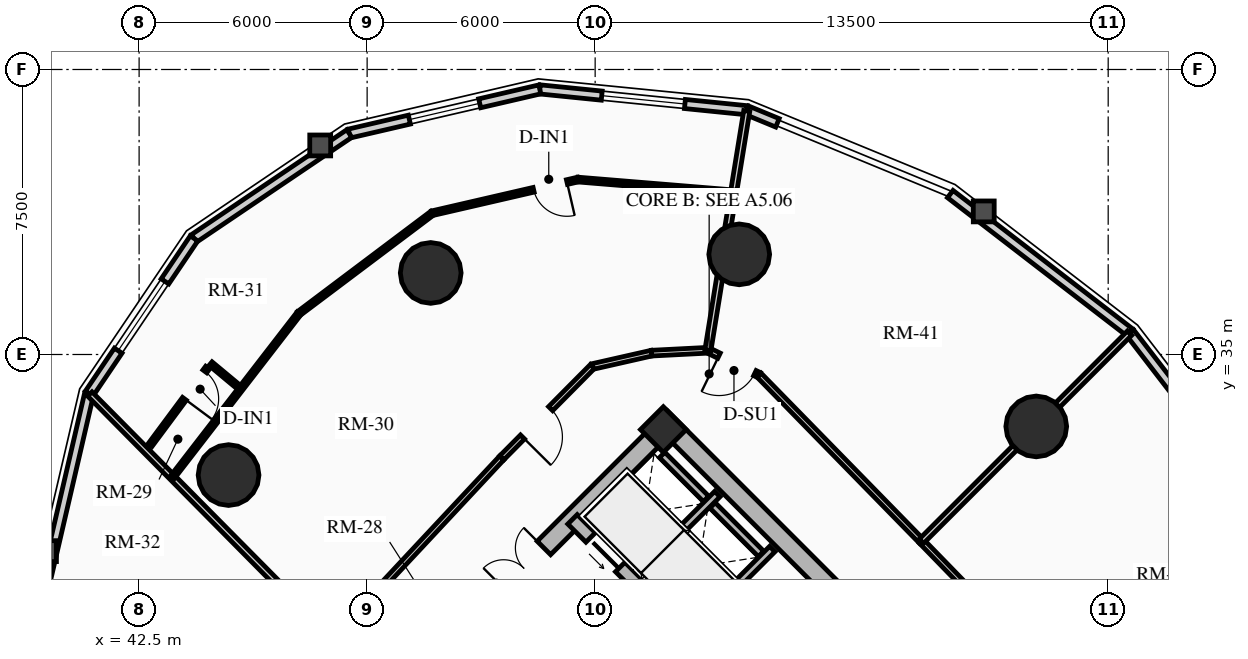
"""IFC4 building model, lengths in metres.
Left out: names, types, materials, properties, quantities, classifications, styles, units other than length and angle.
Written with IfcOpenShell. Run it as: python <this file> out.ifc"""

import sys

from ifc_helpers import new_model, si_unit, direction, frame, frame_2d, origin, origin_2d, place, context, subcontext, project, spatial, rectangle, circle, extrude, source, transform, mapped, element, fill, save


model = new_model("IFC4")
c1 = context("Model", 3, precision=1e-05, world=origin(), true_north=direction((0.0, 1.0)))
c2 = subcontext(c1, "Body", "Model", "MODEL_VIEW")
j1 = project(units=[si_unit("LENGTHUNIT", "METRE"), si_unit("PLANEANGLEUNIT", "RADIAN")], contexts=[c1])
p1 = place(None, origin())
s1 = spatial("IfcSite", under=j1, at=p1, CompositionType="ELEMENT")
p2 = place(p1, origin())
s2 = spatial("IfcBuilding", under=s1, at=p2, CompositionType="ELEMENT")
p3 = place(p2, frame((0.0, 0.0, 62.74)))
s3 = spatial("IfcBuildingStorey", under=s2, at=p3, CompositionType="ELEMENT", Elevation=62.74)
p4 = place(p3, frame((66.339, 23.227, 0.0), z_axis=(0.0, 0.0, 1.0), x_axis=(-0.707106781187, 0.707106781187, 0.0)))
e1 = element("IfcWall", 1, at=p4, inside=s3, PredefinedType="SHEAR", context=c2, shape_type="SweptSolid", body=[
    extrude(rectangle(XDim=14.3, YDim=0.5, at=frame_2d((7.15, 0.0))), origin(), (0.0, 0.0, 1.0), 2.91),
])
p5 = place(p3, frame((48.838, 25.596, 0.0), z_axis=(0.0, 0.0, 1.0), x_axis=(0.707106781187, 0.707106781187, 0.0)))
e2 = element("IfcWall", 2, at=p5, inside=s3, PredefinedType="SHEAR", context=c2, shape_type="SweptSolid", body=[
    extrude(rectangle(XDim=10.7, YDim=0.5, at=frame_2d((5.35, 0.0))), origin(), (0.0, 0.0, 1.0), 2.91),
])
m1 = source(origin(), c2, "Body", "SweptSolid", [
    extrude(rectangle(XDim=1.5, YDim=2.02, at=frame_2d((0.75, 1.01))), frame((0.0, 0.26, 0.0), z_axis=(0.0, -1.0, 0.0), x_axis=(1.0, 0.0, 0.0)), (0.0, 0.0, 1.0), 0.52),
])
p6 = place(p5, frame((4.6, 0.0, 0.0)))
e3 = element("IfcOpeningElement", 3, at=p6, cuts=e2, PredefinedType="OPENING", context=c2, shape_type="MappedRepresentation", body=[
    mapped(m1, transform((0.0, 0.0, 0.0), x_axis=(1.0, 0.0, 0.0), y_axis=(0.0, 1.0, 0.0), z_axis=(0.0, 0.0, 1.0), scale=1.0)),
])
p7 = place(p3, frame((63.662, 20.904, 0.0), z_axis=(0.0, 0.0, 1.0), x_axis=(-0.707106781187, 0.707106781187, 0.0)))
e4 = element("IfcWall", 4, at=p7, inside=s3, PredefinedType="SHEAR", context=c2, shape_type="SweptSolid", body=[
    extrude(rectangle(XDim=13.8, YDim=0.35, at=frame_2d((6.9, 0.0))), origin(), (0.0, 0.0, 1.0), 2.91),
])
m2 = source(origin(), c2, "Body", "SweptSolid", [
    extrude(rectangle(XDim=1.1, YDim=2.015, at=frame_2d((0.55, 1.007))), frame((0.0, 0.185, 0.0), z_axis=(0.0, -1.0, 0.0), x_axis=(1.0, 0.0, 0.0)), (0.0, 0.0, 1.0), 0.37),
])
p8 = place(p7, frame((10.025, 0.0, 0.0)))
e5 = element("IfcOpeningElement", 5, at=p8, cuts=e4, PredefinedType="OPENING", context=c2, shape_type="MappedRepresentation", body=[
    mapped(m2, transform((0.0, 0.0, 0.0), x_axis=(1.0, 0.0, 0.0), y_axis=(0.0, 1.0, 0.0), z_axis=(0.0, 0.0, 1.0), scale=1.0)),
])
p9 = place(p7, frame((12.025, 0.0, 0.0)))
e6 = element("IfcOpeningElement", 6, at=p9, cuts=e4, PredefinedType="OPENING", context=c2, shape_type="MappedRepresentation", body=[
    mapped(m2, transform((0.0, 0.0, 0.0), x_axis=(1.0, 0.0, 0.0), y_axis=(0.0, 1.0, 0.0), z_axis=(0.0, 0.0, 1.0), scale=1.0)),
])
m3 = source(origin(), c2, "Body", "SweptSolid", [
    extrude(rectangle(XDim=1.15, YDim=2.02, at=frame_2d((0.575, 1.01))), frame((0.0, 0.185, 0.0), z_axis=(0.0, -1.0, 0.0), x_axis=(1.0, 0.0, 0.0)), (0.0, 0.0, 1.0), 0.37),
])
p10 = place(p7, frame((5.33, 0.0, 0.0)))
e7 = element("IfcOpeningElement", 7, at=p10, cuts=e4, PredefinedType="OPENING", context=c2, shape_type="MappedRepresentation", body=[
    mapped(m3, transform((0.0, 0.0, 0.0), x_axis=(1.0, 0.0, 0.0), y_axis=(0.0, 1.0, 0.0), z_axis=(0.0, 0.0, 1.0), scale=1.0)),
])
p11 = place(p3, frame((56.294, 33.024, 0.0), z_axis=(0.0, 0.0, 1.0), x_axis=(0.707106781187, 0.707106781187, 0.0)))
e8 = element("IfcColumn", 8, at=p11, inside=s3, PredefinedType="COLUMN", context=c2, shape_type="SweptSolid", body=[
    extrude(rectangle(XDim=0.85, YDim=0.85, at=origin_2d()), origin(), (0.0, 0.0, 1.0), 2.91),
])
for number, where, z_axis, x_axis in (
    (9, (66.107, 33.107, 0.0), (0.0, 0.0, 1.0), (1.0, 0.0, 0.0)),
    (10, (58.291, 37.635, 0.0), (0.0, 0.0, 1.0), (1.0, 0.0, 0.0)),
    (11, (50.173, 37.146, 0.0), (0.0, 0.0, 1.0), (1.0, 0.0, 0.0)),
    (12, (44.854, 31.827, 0.0), (0.0, 0.0, 1.0), (1.0, 0.0, 0.0)),
):
    element("IfcColumn", number, at=place(p3, frame(where, z_axis=z_axis, x_axis=x_axis)), inside=s3, PredefinedType="USERDEFINED", context=c2, shape_type="SweptSolid", body=[
        extrude(circle(Radius=0.8, at=origin_2d()), origin(), (0.0, 0.0, 1.0), 2.91),
    ])
p12 = place(p3, frame((63.844, 39.222, 0.0), z_axis=(0.0, 0.0, 1.0), x_axis=(0.792014314407, -0.610502519057, 0.0)))
e13 = element("IfcWall", 13, at=p12, inside=s3, PredefinedType="SOLIDWALL", context=c2, shape_type="SweptSolid", body=[
    extrude(rectangle(XDim=5.973, YDim=0.24, at=frame_2d((2.987, 0.0))), origin(), (0.0, 0.0, 1.0), 2.079),
])
p13 = place(p3, frame((58.493, 41.428, 0.0), z_axis=(0.0, 0.0, 1.0), x_axis=(0.924556017656, -0.381046152345, 0.0)))
e14 = element("IfcWall", 14, at=p13, inside=s3, PredefinedType="SOLIDWALL", context=c2, shape_type="SweptSolid", body=[
    extrude(rectangle(XDim=0.87, YDim=0.24, at=frame_2d((0.435, 0.0))), origin(), (0.0, 0.0, 1.0), 2.079),
])
p14 = place(p3, frame((53.043, 41.976, 0.0), z_axis=(0.0, 0.0, 1.0), x_axis=(0.994970765694, -0.100165739718, 0.0)))
e15 = element("IfcWall", 15, at=p14, inside=s3, PredefinedType="SOLIDWALL", context=c2, shape_type="SweptSolid", body=[
    extrude(rectangle(XDim=5.477, YDim=0.24, at=frame_2d((2.738, 0.0))), origin(), (0.0, 0.0, 1.0), 2.079),
])
m4 = source(origin(), c2, "Body", "SweptSolid", [
    extrude(rectangle(XDim=2.2, YDim=1.35, at=frame_2d((1.1, 0.675))), frame((0.0, 0.13, 0.0), z_axis=(0.0, -1.0, 0.0), x_axis=(1.0, 0.0, 0.0)), (0.0, 0.0, 1.0), 0.26),
])
p15 = place(p14, frame((1.638, 0.0, 0.65)))
e16 = element("IfcOpeningElement", 16, at=p15, cuts=e15, PredefinedType="OPENING", context=c2, shape_type="MappedRepresentation", body=[
    mapped(m4, transform((0.0, 0.0, 0.0), x_axis=(1.0, 0.0, 0.0), y_axis=(0.0, 1.0, 0.0), z_axis=(0.0, 0.0, 1.0), scale=1.0)),
])
p16 = place(p3, frame((48.031, 40.814, 0.0), z_axis=(0.0, 0.0, 1.0), x_axis=(0.974166016949, 0.225833060959, 0.0)))
e17 = element("IfcWall", 17, at=p16, inside=s3, PredefinedType="SOLIDWALL", context=c2, shape_type="SweptSolid", body=[
    extrude(rectangle(XDim=5.146, YDim=0.24, at=frame_2d((2.573, 0.0))), origin(), (0.0, 0.0, 1.0), 2.079),
])
m5 = source(origin(), c2, "Body", "SweptSolid", [
    extrude(rectangle(XDim=1.9, YDim=1.35, at=frame_2d((0.95, 0.675))), frame((0.0, 0.13, 0.0), z_axis=(0.0, -1.0, 0.0), x_axis=(1.0, 0.0, 0.0)), (0.0, 0.0, 1.0), 0.26),
])
p17 = place(p16, frame((1.623, 0.0, 0.65)))
e18 = element("IfcOpeningElement", 18, at=p17, cuts=e17, PredefinedType="OPENING", context=c2, shape_type="MappedRepresentation", body=[
    mapped(m5, transform((0.0, 0.0, 0.0), x_axis=(1.0, 0.0, 0.0), y_axis=(0.0, 1.0, 0.0), z_axis=(0.0, 0.0, 1.0), scale=1.0)),
])
p18 = place(p3, frame((43.945, 38.055, 0.0), z_axis=(0.0, 0.0, 1.0), x_axis=(0.828736708604, 0.559638693991, 0.0)))
e19 = element("IfcWall", 19, at=p18, inside=s3, PredefinedType="SOLIDWALL", context=c2, shape_type="SweptSolid", body=[
    extrude(rectangle(XDim=4.93, YDim=0.24, at=frame_2d((2.465, 0.0))), origin(), (0.0, 0.0, 1.0), 2.079),
])
p19 = place(p3, frame((41.186, 33.969, 0.0), z_axis=(0.0, 0.0, 1.0), x_axis=(0.559638693991, 0.828736708604, 0.0)))
e20 = element("IfcWall", 20, at=p19, inside=s3, PredefinedType="SOLIDWALL", context=c2, shape_type="SweptSolid", body=[
    extrude(rectangle(XDim=4.93, YDim=0.24, at=frame_2d((2.465, 0.0))), origin(), (0.0, 0.0, 1.0), 2.079),
])
p20 = place(p19, frame((1.365, 0.0, 0.65)))
e21 = element("IfcOpeningElement", 21, at=p20, cuts=e20, PredefinedType="OPENING", context=c2, shape_type="MappedRepresentation", body=[
    mapped(m4, transform((0.0, 0.0, 0.0), x_axis=(1.0, 0.0, 0.0), y_axis=(0.0, 1.0, 0.0), z_axis=(0.0, 0.0, 1.0), scale=1.0)),
])
p21 = place(p3, frame((40.024, 28.957, 0.0), z_axis=(0.0, 0.0, 1.0), x_axis=(0.225833060959, 0.974166016949, 0.0)))
e22 = element("IfcWall", 22, at=p21, inside=s3, PredefinedType="SOLIDWALL", context=c2, shape_type="SweptSolid", body=[
    extrude(rectangle(XDim=5.146, YDim=0.24, at=frame_2d((2.573, 0.0))), origin(), (0.0, 0.0, 1.0), 2.079),
])
p22 = place(p3, frame((68.575, 35.575, 0.0), z_axis=(0.0, 0.0, 1.0), x_axis=(0.610502519057, -0.792014314407, 0.0)))
e23 = element("IfcWall", 23, at=p22, inside=s3, PredefinedType="SOLIDWALL", context=c2, shape_type="SweptSolid", body=[
    extrude(rectangle(XDim=5.973, YDim=0.24, at=frame_2d((2.987, 0.0))), origin(), (0.0, 0.0, 1.0), 2.079),
])
p23 = place(p22, frame((2.037, 0.0, 0.65)))
e24 = element("IfcOpeningElement", 24, at=p23, cuts=e23, PredefinedType="OPENING", context=c2, shape_type="MappedRepresentation", body=[
    mapped(m5, transform((0.0, 0.0, 0.0), x_axis=(1.0, 0.0, 0.0), y_axis=(0.0, 1.0, 0.0), z_axis=(0.0, 0.0, 1.0), scale=1.0)),
])
p24 = place(p3, frame((57.062, 27.781, 0.0), z_axis=(0.0, 0.0, 1.0), x_axis=(0.707106781187, 0.707106781187, 0.0)))
e25 = element("IfcWall", 25, at=p24, inside=s3, PredefinedType="SHEAR", context=c2, shape_type="SweptSolid", body=[
    extrude(rectangle(XDim=2.97, YDim=0.2, at=frame_2d((1.485, 0.0))), origin(), (0.0, 0.0, 1.0), 2.91),
])
p25 = place(p3, frame((55.615, 29.227, 0.0), z_axis=(0.0, 0.0, 1.0), x_axis=(0.707147878904, 0.70706568108, 0.0)))
e26 = element("IfcWall", 26, at=p25, inside=s3, PredefinedType="SHEAR", context=c2, shape_type="SweptSolid", body=[
    extrude(rectangle(XDim=2.97, YDim=0.2, at=frame_2d((1.485, 0.0))), origin(), (0.0, 0.0, 1.0), 2.91),
])
p26 = place(p3, frame((58.865, 29.754, 0.0), z_axis=(0.0, 0.0, 1.0), x_axis=(-0.707174411312, 0.707039144592, 0.0)))
e27 = element("IfcWall", 27, at=p26, inside=s3, PredefinedType="SHEAR", context=c2, shape_type="SweptSolid", body=[
    extrude(rectangle(XDim=1.805, YDim=0.2, at=frame_2d((0.902, 0.0))), origin(), (0.0, 0.0, 1.0), 2.91),
])
p27 = place(p3, frame((57.419, 31.2, 0.0), z_axis=(0.0, 0.0, 1.0), x_axis=(-0.707032117043, 0.707181437447, 0.0)))
e28 = element("IfcWall", 28, at=p27, inside=s3, PredefinedType="SHEAR", context=c2, shape_type="SweptSolid", body=[
    extrude(rectangle(XDim=1.635, YDim=0.2, at=frame_2d((0.817, 0.0))), origin(), (0.0, 0.0, 1.0), 2.91),
])
p28 = place(p3, frame((63.086, 30.086, 0.0), z_axis=(0.0, 0.0, 1.0), x_axis=(-0.699075897379, 0.715047473741, 0.0)))
e29 = element("IfcWall", 29, at=p28, inside=s3, PredefinedType="PARTITIONING", context=c2, shape_type="SweptSolid", body=[
    extrude(rectangle(XDim=6.114, YDim=0.15, at=frame_2d((3.057, 0.0))), origin(), (0.0, 0.0, 1.0), 2.079),
])
p29 = place(p3, frame((58.812, 34.458, 0.0), z_axis=(0.0, 0.0, 1.0), x_axis=(-0.899559490277, 0.436798264021, 0.0)))
e30 = element("IfcWall", 30, at=p29, inside=s3, PredefinedType="PARTITIONING", context=c2, shape_type="SweptSolid", body=[
    extrude(rectangle(XDim=1.495, YDim=0.15, at=frame_2d((0.748, 0.0))), origin(), (0.0, 0.0, 1.0), 2.125),
])
m6 = source(origin(), c2, "Body", "SweptSolid", [
    extrude(rectangle(XDim=1.05, YDim=2.015, at=frame_2d((0.525, 1.007))), frame((0.0, 0.085, 0.0), z_axis=(0.0, -1.0, 0.0), x_axis=(1.0, 0.0, 0.0)), (0.0, 0.0, 1.0), 0.17),
])
p30 = place(p29, frame((0.12, 0.0, 0.0)))
e31 = element("IfcOpeningElement", 31, at=p30, cuts=e30, PredefinedType="OPENING", context=c2, shape_type="MappedRepresentation", body=[
    mapped(m6, transform((0.0, 0.0, 0.0), x_axis=(1.0, 0.0, 0.0), y_axis=(0.0, 1.0, 0.0), z_axis=(0.0, 0.0, 1.0), scale=1.0)),
])
p31 = place(p3, frame((57.467, 35.111, 0.0), z_axis=(0.0, 0.0, 1.0), x_axis=(-0.998691757323, -0.051134859488, 0.0)))
e32 = element("IfcWall", 32, at=p31, inside=s3, PredefinedType="PARTITIONING", context=c2, shape_type="SweptSolid", body=[
    extrude(rectangle(XDim=1.485, YDim=0.15, at=frame_2d((0.742, 0.0))), origin(), (0.0, 0.0, 1.0), 2.079),
])
p32 = place(p3, frame((55.984, 35.035, 0.0), z_axis=(0.0, 0.0, 1.0), x_axis=(-0.975290305708, -0.22092718165, 0.0)))
e33 = element("IfcWall", 33, at=p32, inside=s3, PredefinedType="PARTITIONING", context=c2, shape_type="SweptSolid", body=[
    extrude(rectangle(XDim=1.597, YDim=0.15, at=frame_2d((0.798, 0.0))), origin(), (0.0, 0.0, 1.0), 2.125),
])
p33 = place(p3, frame((54.427, 34.683, 0.0), z_axis=(0.0, 0.0, 1.0), x_axis=(-0.704178989986, -0.710022499687, 0.0)))
e34 = element("IfcWall", 34, at=p33, inside=s3, PredefinedType="PARTITIONING", context=c2, shape_type="SweptSolid", body=[
    extrude(rectangle(XDim=3.384, YDim=0.15, at=frame_2d((1.692, 0.0))), origin(), (0.0, 0.0, 1.0), 2.079),
])
p34 = place(p33, frame((1.56, 0.0, 0.0)))
e35 = element("IfcOpeningElement", 35, at=p34, cuts=e34, PredefinedType="OPENING", context=c2, shape_type="MappedRepresentation", body=[
    mapped(m6, transform((0.0, 0.0, 0.0), x_axis=(1.0, 0.0, 0.0), y_axis=(0.0, 1.0, 0.0), z_axis=(0.0, 0.0, 1.0), scale=1.0)),
])
p35 = place(p3, frame((52.043, 32.28, 0.0), z_axis=(0.0, 0.0, 1.0), x_axis=(-0.682606081633, -0.730786519661, 0.0)))
e36 = element("IfcWall", 36, at=p35, inside=s3, PredefinedType="PARTITIONING", context=c2, shape_type="SweptSolid", body=[
    extrude(rectangle(XDim=6.527, YDim=0.15, at=frame_2d((3.263, 0.0))), origin(), (0.0, 0.0, 1.0), 2.079),
])
p36 = place(p3, frame((67.27, 25.78, 0.0), z_axis=(0.0, 0.0, 1.0), x_axis=(-0.696847842907, 0.717218992942, 0.0)))
e37 = element("IfcWall", 37, at=p36, inside=s3, PredefinedType="PARTITIONING", context=c2, shape_type="SweptSolid", body=[
    extrude(rectangle(XDim=6.004, YDim=0.15, at=frame_2d((3.002, 0.0))), origin(), (0.0, 0.0, 1.0), 2.555),
])
m7 = source(origin(), c2, "Body", "SweptSolid", [
    extrude(rectangle(XDim=1.0, YDim=2.015, at=frame_2d((0.5, 1.007))), frame((0.0, 0.085, 0.0), z_axis=(0.0, -1.0, 0.0), x_axis=(1.0, 0.0, 0.0)), (0.0, 0.0, 1.0), 0.17),
])
p37 = place(p36, frame((2.502, 0.0, 0.0)))
e38 = element("IfcOpeningElement", 38, at=p37, cuts=e37, PredefinedType="OPENING", context=c2, shape_type="MappedRepresentation", body=[
    mapped(m7, transform((0.0, 0.0, 0.0), x_axis=(1.0, 0.0, 0.0), y_axis=(0.0, 1.0, 0.0), z_axis=(0.0, 0.0, 1.0), scale=1.0)),
])
p38 = place(p3, frame((63.086, 30.086, 0.0), z_axis=(0.0, 0.0, 1.0), x_axis=(0.707106781187, 0.707106781187, 0.0)))
e39 = element("IfcWall", 39, at=p38, inside=s3, PredefinedType="PARTITIONING", context=c2, shape_type="SweptSolid", body=[
    extrude(rectangle(XDim=7.743, YDim=0.16, at=frame_2d((3.872, 0.0))), origin(), (0.0, 0.0, 1.0), 2.079),
])
p39 = place(p3, frame((57.467, 35.111, 0.0), z_axis=(0.0, 0.0, 1.0), x_axis=(0.160314040356, 0.987066060841, 0.0)))
e40 = element("IfcWall", 40, at=p39, inside=s3, PredefinedType="PARTITIONING", context=c2, shape_type="SweptSolid", body=[
    extrude(rectangle(XDim=6.379, YDim=0.16, at=frame_2d((3.19, 0.0))), origin(), (0.0, 0.0, 1.0), 2.079),
])
p40 = place(p3, frame((47.588, 27.51, 0.0), z_axis=(0.0, 0.0, 1.0), x_axis=(-0.703506421614, 0.710688901523, 0.0)))
e41 = element("IfcWall", 41, at=p40, inside=s3, PredefinedType="PARTITIONING", context=c2, shape_type="SweptSolid", body=[
    extrude(rectangle(XDim=9.076, YDim=0.16, at=frame_2d((4.538, 0.0))), origin(), (0.0, 0.0, 1.0), 2.079),
])
p41 = place(p3, frame((58.142, 39.267, 0.0), z_axis=(0.0, 0.0, 1.0), x_axis=(-0.99664458574, 0.081850899288, 0.0)))
e42 = element("IfcWall", 42, at=p41, inside=s3, PredefinedType="PARTITIONING", context=c2, shape_type="SweptSolid", body=[
    extrude(rectangle(XDim=4.11, YDim=0.125, at=frame_2d((2.055, 0.0))), origin(), (0.0, 0.0, 1.0), 2.555),
])
p42 = place(p3, frame((54.045, 39.604, 0.0), z_axis=(0.0, 0.0, 1.0), x_axis=(-0.974339935028, -0.225081520808, 0.0)))
e43 = element("IfcWall", 43, at=p42, inside=s3, PredefinedType="PARTITIONING", context=c2, shape_type="SweptSolid", body=[
    extrude(rectangle(XDim=3.935, YDim=0.125, at=frame_2d((1.968, 0.0))), origin(), (0.0, 0.0, 1.0), 2.125),
])
m8 = source(origin(), c2, "Body", "SweptSolid", [
    extrude(rectangle(XDim=0.9, YDim=2.005, at=frame_2d((0.45, 1.002))), frame((0.0, 0.073, 0.0), z_axis=(0.0, -1.0, 0.0), x_axis=(1.0, 0.0, 0.0)), (0.0, 0.0, 1.0), 0.145),
])
p43 = place(p42, frame((0.295, 0.0, 0.0)))
e44 = element("IfcOpeningElement", 44, at=p43, cuts=e43, PredefinedType="OPENING", context=c2, shape_type="MappedRepresentation", body=[
    mapped(m8, transform((0.0, 0.0, 0.0), x_axis=(1.0, 0.0, 0.0), y_axis=(0.0, 1.0, 0.0), z_axis=(0.0, 0.0, 1.0), scale=1.0)),
])
p44 = place(p3, frame((50.211, 38.718, 0.0), z_axis=(0.0, 0.0, 1.0), x_axis=(-0.799130420348, -0.601157692519, 0.0)))
e45 = element("IfcWall", 45, at=p44, inside=s3, PredefinedType="PARTITIONING", context=c2, shape_type="SweptSolid", body=[
    extrude(rectangle(XDim=4.384, YDim=0.125, at=frame_2d((2.192, 0.0))), origin(), (0.0, 0.0, 1.0), 2.079),
])
p45 = place(p3, frame((46.708, 36.082, 0.0), z_axis=(0.0, 0.0, 1.0), x_axis=(-0.611308591704, -0.791392320982, 0.0)))
e46 = element("IfcWall", 46, at=p45, inside=s3, PredefinedType="PARTITIONING", context=c2, shape_type="SweptSolid", body=[
    extrude(rectangle(XDim=5.453, YDim=0.125, at=frame_2d((2.726, 0.0))), origin(), (0.0, 0.0, 1.0), 2.079),
])
p46 = place(p3, frame((45.1, 34.159, 0.0), z_axis=(0.0, 0.0, 1.0), x_axis=(-0.768669758301, 0.639645841598, 0.0)))
e47 = element("IfcWall", 47, at=p46, inside=s3, PredefinedType="PARTITIONING", context=c2, shape_type="SweptSolid", body=[
    extrude(rectangle(XDim=0.937, YDim=0.125, at=frame_2d((0.468, 0.0))), origin(), (0.0, 0.0, 1.0), 2.555),
])
p47 = place(p3, frame((44.301, 34.653, 0.0), z_axis=(0.0, 0.0, 1.0), x_axis=(-0.59612539604, -0.802891345199, 0.0)))
e48 = element("IfcWall", 48, at=p47, inside=s3, PredefinedType="PARTITIONING", context=c2, shape_type="SweptSolid", body=[
    extrude(rectangle(XDim=2.535, YDim=0.125, at=frame_2d((1.268, 0.0))), origin(), (0.0, 0.0, 1.0), 2.079),
])
p48 = place(p47, frame((0.12, 0.0, 0.0)))
e49 = element("IfcOpeningElement", 49, at=p48, cuts=e48, PredefinedType="OPENING", context=c2, shape_type="MappedRepresentation", body=[
    mapped(m8, transform((0.0, 0.0, 0.0), x_axis=(1.0, 0.0, 0.0), y_axis=(0.0, 1.0, 0.0), z_axis=(0.0, 0.0, 1.0), scale=1.0)),
])
m9 = source(origin(), c2, "Body", "SweptSolid", [
    extrude(rectangle(XDim=2.2, YDim=1.35, at=frame_2d((1.1, 0.675))), frame((0.0, 0.03, 0.0), z_axis=(0.0, -1.0, 0.0), x_axis=(1.0, 0.0, 0.0)), (0.0, 0.0, 1.0), 0.06),
])
p49 = place(p15, origin())
e50 = element("IfcWindow", 50, at=p49, inside=s3, PartitioningType="DOUBLE_PANEL_VERTICAL", PredefinedType="WINDOW", context=c2, shape_type="MappedRepresentation", body=[
    mapped(m9, transform((0.0, 0.0, 0.0), x_axis=(1.0, 0.0, 0.0), y_axis=(0.0, 1.0, 0.0), z_axis=(0.0, 0.0, 1.0), scale=1.0)),
])
fill(e16, e50)
m10 = source(origin(), c2, "Body", "SweptSolid", [
    extrude(rectangle(XDim=1.9, YDim=1.35, at=frame_2d((0.95, 0.675))), frame((0.0, 0.03, 0.0), z_axis=(0.0, -1.0, 0.0), x_axis=(1.0, 0.0, 0.0)), (0.0, 0.0, 1.0), 0.06),
])
p50 = place(p17, origin())
e51 = element("IfcWindow", 51, at=p50, inside=s3, PartitioningType="DOUBLE_PANEL_VERTICAL", PredefinedType="WINDOW", context=c2, shape_type="MappedRepresentation", body=[
    mapped(m10, transform((0.0, 0.0, 0.0), x_axis=(1.0, 0.0, 0.0), y_axis=(0.0, 1.0, 0.0), z_axis=(0.0, 0.0, 1.0), scale=1.0)),
])
fill(e18, e51)
p51 = place(p20, origin())
e52 = element("IfcWindow", 52, at=p51, inside=s3, PartitioningType="DOUBLE_PANEL_VERTICAL", PredefinedType="WINDOW", context=c2, shape_type="MappedRepresentation", body=[
    mapped(m9, transform((0.0, 0.0, 0.0), x_axis=(1.0, 0.0, 0.0), y_axis=(0.0, 1.0, 0.0), z_axis=(0.0, 0.0, 1.0), scale=1.0)),
])
fill(e21, e52)
m11 = source(origin(), c2, "Body", "SweptSolid", [
    extrude(rectangle(XDim=1.1, YDim=2.015, at=frame_2d((0.55, 1.007))), frame((0.0, 0.025, 0.0), z_axis=(0.0, -1.0, 0.0), x_axis=(1.0, 0.0, 0.0)), (0.0, 0.0, 1.0), 0.05),
])
p52 = place(p9, origin())
e53 = element("IfcDoor", 53, at=p52, inside=s3, OperationType="SLIDING_TO_LEFT", PredefinedType="DOOR", context=c2, shape_type="MappedRepresentation", body=[
    mapped(m11, transform((0.0, 0.0, 0.0), x_axis=(1.0, 0.0, 0.0), y_axis=(0.0, 1.0, 0.0), z_axis=(0.0, 0.0, 1.0), scale=1.0)),
])
fill(e6, e53)
m12 = source(origin(), c2, "Body", "SweptSolid", [
    extrude(rectangle(XDim=1.5, YDim=2.02, at=frame_2d((0.75, 1.01))), frame((0.0, 0.025, 0.0), z_axis=(0.0, -1.0, 0.0), x_axis=(1.0, 0.0, 0.0)), (0.0, 0.0, 1.0), 0.05),
])
p53 = place(p6, origin())
e54 = element("IfcDoor", 54, at=p53, inside=s3, OperationType="DOUBLE_DOOR_SINGLE_SWING", PredefinedType="DOOR", context=c2, shape_type="MappedRepresentation", body=[
    mapped(m12, transform((0.0, 0.0, 0.0), x_axis=(1.0, 0.0, 0.0), y_axis=(0.0, 1.0, 0.0), z_axis=(0.0, 0.0, 1.0), scale=1.0)),
])
fill(e3, e54)
m13 = source(origin(), c2, "Body", "SweptSolid", [
    extrude(rectangle(XDim=1.05, YDim=2.015, at=frame_2d((0.525, 1.007))), frame((0.0, 0.025, 0.0), z_axis=(0.0, -1.0, 0.0), x_axis=(1.0, 0.0, 0.0)), (0.0, 0.0, 1.0), 0.05),
])
p54 = place(p34, origin())
e55 = element("IfcDoor", 55, at=p54, inside=s3, OperationType="SINGLE_SWING_RIGHT", PredefinedType="DOOR", context=c2, shape_type="MappedRepresentation", body=[
    mapped(m13, transform((0.0, 0.0, 0.0), x_axis=(1.0, 0.0, 0.0), y_axis=(0.0, 1.0, 0.0), z_axis=(0.0, 0.0, 1.0), scale=1.0)),
])
fill(e35, e55)
m14 = source(origin(), c2, "Body", "SweptSolid", [
    extrude(rectangle(XDim=0.9, YDim=2.005, at=frame_2d((0.45, 1.002))), frame((0.0, 0.025, 0.0), z_axis=(0.0, -1.0, 0.0), x_axis=(1.0, 0.0, 0.0)), (0.0, 0.0, 1.0), 0.05),
])
p55 = place(p43, origin())
e56 = element("IfcDoor", 56, at=p55, inside=s3, OperationType="SINGLE_SWING_LEFT", PredefinedType="DOOR", context=c2, shape_type="MappedRepresentation", body=[
    mapped(m14, transform((0.0, 0.0, 0.0), x_axis=(1.0, 0.0, 0.0), y_axis=(0.0, 1.0, 0.0), z_axis=(0.0, 0.0, 1.0), scale=1.0)),
])
fill(e44, e56)
p56 = place(p48, origin())
e57 = element("IfcDoor", 57, at=p56, inside=s3, OperationType="SINGLE_SWING_RIGHT", PredefinedType="DOOR", context=c2, shape_type="MappedRepresentation", body=[
    mapped(m14, transform((0.0, 0.0, 0.0), x_axis=(1.0, 0.0, 0.0), y_axis=(0.0, 1.0, 0.0), z_axis=(0.0, 0.0, 1.0), scale=1.0)),
])
fill(e49, e57)
p57 = place(p30, origin())
e58 = element("IfcDoor", 58, at=p57, inside=s3, OperationType="SINGLE_SWING_RIGHT", PredefinedType="DOOR", context=c2, shape_type="MappedRepresentation", body=[
    mapped(m13, transform((0.0, 0.0, 0.0), x_axis=(1.0, 0.0, 0.0), y_axis=(0.0, 1.0, 0.0), z_axis=(0.0, 0.0, 1.0), scale=1.0)),
])
fill(e31, e58)
save(model, sys.argv[1])
